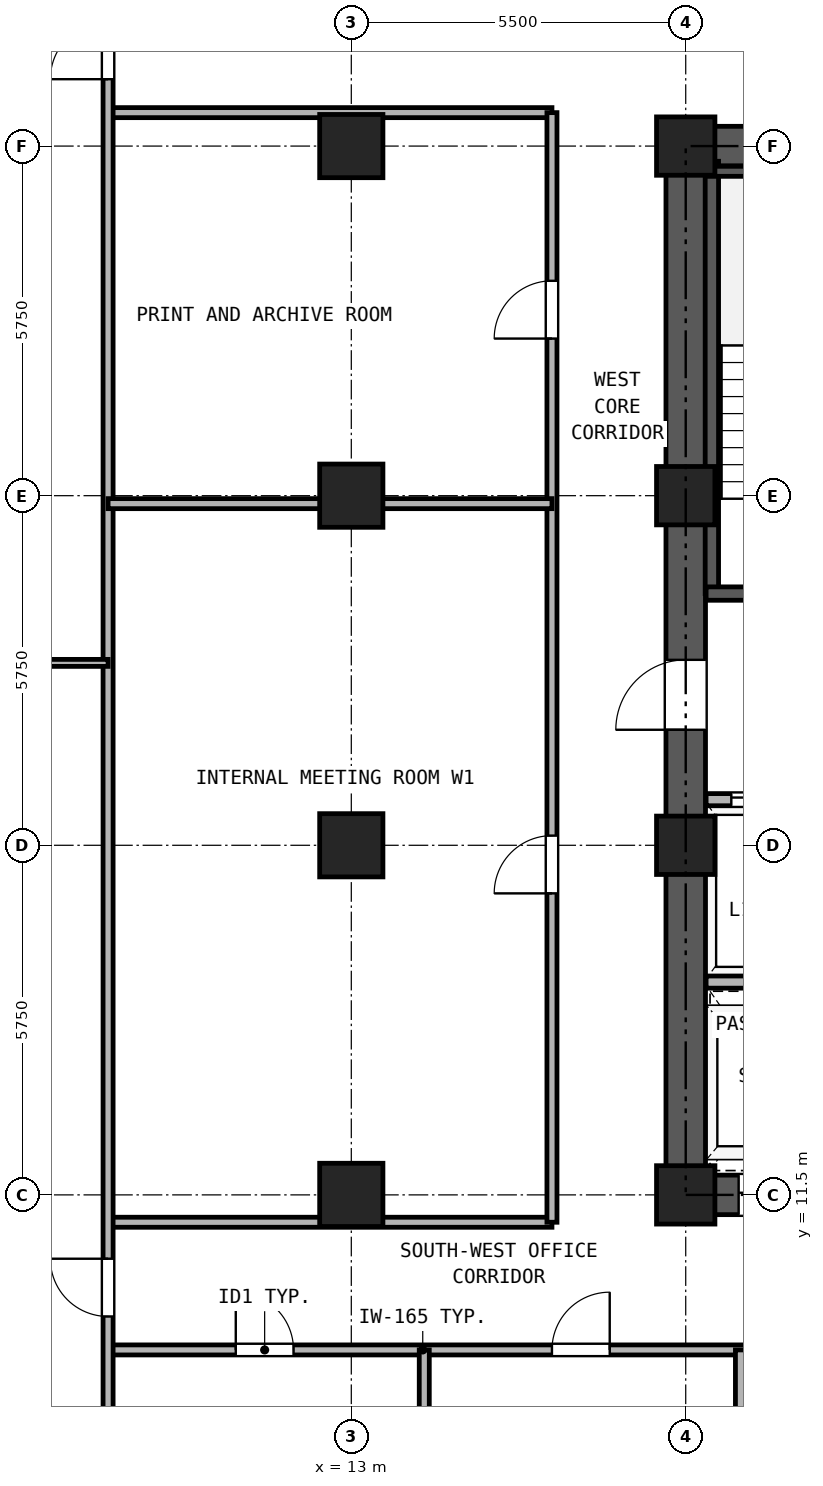
"""IFC4 building model, lengths in metres.
Left out: names, types, materials, properties, quantities, classifications, styles, units other than length and angle.
Written with IfcOpenShell. Run it as: python <this file> out.ifc"""

import sys

from ifc_helpers import new_model, si_unit, direction, frame, frame_2d, origin, origin_2d, place, context, subcontext, project, spatial, rectangle, hollow_rectangle, extrude, source, transform, mapped, element, fill, save


model = new_model("IFC4")
c1 = context("Model", 3, precision=1e-05, world=origin(), true_north=direction((0.0, 1.0)))
c2 = subcontext(c1, "Body", "Model", "MODEL_VIEW")
j1 = project(units=[si_unit("LENGTHUNIT", "METRE"), si_unit("PLANEANGLEUNIT", "RADIAN")], contexts=[c1])
p1 = place(None, origin())
s1 = spatial("IfcSite", under=j1, at=p1, CompositionType="ELEMENT")
p2 = place(p1, origin())
s2 = spatial("IfcBuilding", under=s1, at=p2, CompositionType="ELEMENT")
p3 = place(p2, frame((0.0, 0.0, 51.3)))
s3 = spatial("IfcBuildingStorey", under=s2, at=p3, CompositionType="ELEMENT", Elevation=51.3)
m1 = source(origin(), c2, "Body", "SweptSolid", [
    extrude(hollow_rectangle(XDim=1.04, YDim=1.04, WallThickness=0.065, at=origin_2d()), origin(), (0.0, 0.0, 1.0), 3.32),
])
for number, where, z_axis, x_axis in (
    (1, (13.0, 11.5, 0.0), (0.0, 0.0, 1.0), (1.0, 0.0, 0.0)),
    (2, (13.0, 17.25, 0.0), (0.0, 0.0, 1.0), (1.0, 0.0, 0.0)),
    (3, (13.0, 23.0, 0.0), (0.0, 0.0, 1.0), (1.0, 0.0, 0.0)),
    (4, (13.0, 28.75, 0.0), (0.0, 0.0, 1.0), (1.0, 0.0, 0.0)),
):
    element("IfcColumn", number, at=place(p3, frame(where, z_axis=z_axis, x_axis=x_axis)), inside=s3, PredefinedType="COLUMN", context=c2, shape_type="MappedRepresentation", body=[
        mapped(m1, transform((0.0, 0.0, 0.0), x_axis=(1.0, 0.0, 0.0), y_axis=(0.0, 1.0, 0.0), z_axis=(0.0, 0.0, 1.0), scale=1.0)),
    ])
m2 = source(origin(), c2, "Body", "SweptSolid", [
    extrude(hollow_rectangle(XDim=0.96, YDim=0.96, WallThickness=0.06, at=origin_2d()), origin(), (0.0, 0.0, 1.0), 3.32),
])
for number, where, z_axis, x_axis in (
    (5, (18.5, 11.5, 0.0), (0.0, 0.0, 1.0), (1.0, 0.0, 0.0)),
    (6, (18.5, 17.25, 0.0), (0.0, 0.0, 1.0), (1.0, 0.0, 0.0)),
    (7, (18.5, 23.0, 0.0), (0.0, 0.0, 1.0), (1.0, 0.0, 0.0)),
    (8, (18.5, 28.75, 0.0), (0.0, 0.0, 1.0), (1.0, 0.0, 0.0)),
):
    element("IfcColumn", number, at=place(p3, frame(where, z_axis=z_axis, x_axis=x_axis)), inside=s3, PredefinedType="COLUMN", context=c2, shape_type="MappedRepresentation", body=[
        mapped(m2, transform((0.0, 0.0, 0.0), x_axis=(1.0, 0.0, 0.0), y_axis=(0.0, 1.0, 0.0), z_axis=(0.0, 0.0, 1.0), scale=1.0)),
    ])
p4 = place(p3, frame((18.175, 11.5, 0.0), z_axis=(0.0, 0.0, 1.0), x_axis=(1.0, 0.0, 0.0)))
e9 = element("IfcWall", 9, at=p4, inside=s3, PredefinedType="SHEAR", context=c2, shape_type="SweptSolid", body=[
    extrude(rectangle(XDim=10.65, YDim=0.65, at=frame_2d((5.325, 0.0))), origin(), (0.0, 0.0, 1.0), 3.32),
])
p5 = place(p4, frame((1.195, 0.0, 0.0)))
e10 = element("IfcOpeningElement", 10, at=p5, cuts=e9, PredefinedType="OPENING", context=c2, shape_type="SweptSolid", body=[
    extrude(rectangle(XDim=1.1, YDim=2.25, at=frame_2d((0.55, 1.125))), frame((0.0, 0.335, 0.0), z_axis=(0.0, -1.0, 0.0), x_axis=(1.0, 0.0, 0.0)), (0.0, 0.0, 1.0), 0.67),
])
p6 = place(p4, frame((3.495, 0.0, 0.0)))
e11 = element("IfcOpeningElement", 11, at=p6, cuts=e9, PredefinedType="OPENING", context=c2, shape_type="SweptSolid", body=[
    extrude(rectangle(XDim=1.1, YDim=2.25, at=frame_2d((0.55, 1.125))), frame((0.0, 0.335, 0.0), z_axis=(0.0, -1.0, 0.0), x_axis=(1.0, 0.0, 0.0)), (0.0, 0.0, 1.0), 0.67),
])
p7 = place(p4, frame((5.925, 0.0, 0.0)))
e12 = element("IfcOpeningElement", 12, at=p7, cuts=e9, PredefinedType="OPENING", context=c2, shape_type="SweptSolid", body=[
    extrude(rectangle(XDim=1.1, YDim=2.25, at=frame_2d((0.55, 1.125))), frame((0.0, 0.335, 0.0), z_axis=(0.0, -1.0, 0.0), x_axis=(1.0, 0.0, 0.0)), (0.0, 0.0, 1.0), 0.67),
])
p8 = place(p4, frame((8.325, 0.0, 0.0)))
e13 = element("IfcOpeningElement", 13, at=p8, cuts=e9, PredefinedType="OPENING", context=c2, shape_type="SweptSolid", body=[
    extrude(rectangle(XDim=1.1, YDim=2.25, at=frame_2d((0.55, 1.125))), frame((0.0, 0.335, 0.0), z_axis=(0.0, -1.0, 0.0), x_axis=(1.0, 0.0, 0.0)), (0.0, 0.0, 1.0), 0.67),
])
p9 = place(p3, frame((18.175, 28.75, 0.0), z_axis=(0.0, 0.0, 1.0), x_axis=(1.0, 0.0, 0.0)))
e14 = element("IfcWall", 14, at=p9, inside=s3, PredefinedType="SHEAR", context=c2, shape_type="SweptSolid", body=[
    extrude(rectangle(XDim=10.65, YDim=0.65, at=frame_2d((5.325, 0.0))), origin(), (0.0, 0.0, 1.0), 3.32),
])
p10 = place(p9, frame((4.205, 0.0, 0.0)))
e15 = element("IfcOpeningElement", 15, at=p10, cuts=e14, PredefinedType="OPENING", context=c2, shape_type="SweptSolid", body=[
    extrude(rectangle(XDim=0.9, YDim=2.05, at=frame_2d((0.45, 1.025))), frame((0.0, 0.335, 0.0), z_axis=(0.0, -1.0, 0.0), x_axis=(1.0, 0.0, 0.0)), (0.0, 0.0, 1.0), 0.67),
])
p11 = place(p9, frame((5.745, 0.0, 0.0)))
e16 = element("IfcOpeningElement", 16, at=p11, cuts=e14, PredefinedType="OPENING", context=c2, shape_type="SweptSolid", body=[
    extrude(rectangle(XDim=0.9, YDim=2.05, at=frame_2d((0.45, 1.025))), frame((0.0, 0.335, 0.0), z_axis=(0.0, -1.0, 0.0), x_axis=(1.0, 0.0, 0.0)), (0.0, 0.0, 1.0), 0.67),
])
p12 = place(p3, frame((18.5, 11.825, 0.0), z_axis=(0.0, 0.0, 1.0), x_axis=(0.0, 1.0, 0.0)))
e17 = element("IfcWall", 17, at=p12, inside=s3, PredefinedType="SHEAR", context=c2, shape_type="SweptSolid", body=[
    extrude(rectangle(XDim=16.6, YDim=0.65, at=frame_2d((8.3, 0.0))), origin(), (0.0, 0.0, 1.0), 3.32),
])
p13 = place(p12, frame((7.325, 0.0, 0.0)))
e18 = element("IfcOpeningElement", 18, at=p13, cuts=e17, PredefinedType="OPENING", context=c2, shape_type="SweptSolid", body=[
    extrude(rectangle(XDim=1.15, YDim=2.2, at=frame_2d((0.575, 1.1))), frame((0.0, 0.335, 0.0), z_axis=(0.0, -1.0, 0.0), x_axis=(1.0, 0.0, 0.0)), (0.0, 0.0, 1.0), 0.67),
])
p14 = place(p3, frame((18.93, 21.39, 0.0), z_axis=(0.0, 0.0, 1.0), x_axis=(0.0, 1.0, 0.0)))
e19 = element("IfcWall", 19, at=p14, inside=s3, PredefinedType="SOLIDWALL", context=c2, shape_type="SweptSolid", body=[
    extrude(rectangle(XDim=7.11, YDim=0.22, at=frame_2d((3.555, 0.0))), origin(), (0.0, 0.0, 1.0), 3.32),
])
p15 = place(p3, frame((18.835, 28.335, 0.0), z_axis=(0.0, 0.0, 1.0), x_axis=(1.0, 0.0, 0.0)))
e20 = element("IfcWall", 20, at=p15, inside=s3, PredefinedType="PARTITIONING", context=c2, shape_type="SweptSolid", body=[
    extrude(rectangle(XDim=3.275, YDim=0.165, at=frame_2d((1.638, 0.0))), origin(), (0.0, 0.0, 1.0), 3.32),
])
p16 = place(p3, frame((18.835, 21.39, 0.0), z_axis=(0.0, 0.0, 1.0), x_axis=(1.0, 0.0, 0.0)))
e21 = element("IfcWall", 21, at=p16, inside=s3, PredefinedType="SOLIDWALL", context=c2, shape_type="SweptSolid", body=[
    extrude(rectangle(XDim=6.295, YDim=0.22, at=frame_2d((3.147, 0.0))), origin(), (0.0, 0.0, 1.0), 3.32),
])
p17 = place(p16, frame((1.015, 0.0, 0.0)))
e22 = element("IfcOpeningElement", 22, at=p17, cuts=e21, PredefinedType="OPENING", context=c2, shape_type="SweptSolid", body=[
    extrude(rectangle(XDim=1.15, YDim=2.2, at=frame_2d((0.575, 1.1))), frame((0.0, 0.12, 0.0), z_axis=(0.0, -1.0, 0.0), x_axis=(1.0, 0.0, 0.0)), (0.0, 0.0, 1.0), 0.24),
])
p18 = place(p16, frame((4.745, 0.0, 0.0)))
e23 = element("IfcOpeningElement", 23, at=p18, cuts=e21, PredefinedType="OPENING", context=c2, shape_type="SweptSolid", body=[
    extrude(rectangle(XDim=1.1, YDim=2.25, at=frame_2d((0.55, 1.125))), frame((0.0, 0.12, 0.0), z_axis=(0.0, -1.0, 0.0), x_axis=(1.0, 0.0, 0.0)), (0.0, 0.0, 1.0), 0.24),
])
p19 = place(p3, frame((18.835, 18.0, 0.0), z_axis=(0.0, 0.0, 1.0), x_axis=(1.0, 0.0, 0.0)))
e24 = element("IfcWall", 24, at=p19, inside=s3, PredefinedType="PARTITIONING", context=c2, shape_type="SweptSolid", body=[
    extrude(rectangle(XDim=9.33, YDim=0.2, at=frame_2d((4.665, 0.0))), origin(), (0.0, 0.0, 1.0), 3.32),
])
p20 = place(p19, frame((0.415, 0.0, 0.0)))
e25 = element("IfcOpeningElement", 25, at=p20, cuts=e24, PredefinedType="OPENING", context=c2, shape_type="SweptSolid", body=[
    extrude(rectangle(XDim=1.3, YDim=2.3, at=frame_2d((0.65, 1.15))), frame((0.0, 0.11, 0.0), z_axis=(0.0, -1.0, 0.0), x_axis=(1.0, 0.0, 0.0)), (0.0, 0.0, 1.0), 0.22),
])
p21 = place(p19, frame((2.515, 0.0, 0.0)))
e26 = element("IfcOpeningElement", 26, at=p21, cuts=e24, PredefinedType="OPENING", context=c2, shape_type="SweptSolid", body=[
    extrude(rectangle(XDim=1.3, YDim=2.3, at=frame_2d((0.65, 1.15))), frame((0.0, 0.11, 0.0), z_axis=(0.0, -1.0, 0.0), x_axis=(1.0, 0.0, 0.0)), (0.0, 0.0, 1.0), 0.22),
])
p22 = place(p19, frame((7.015, 0.0, 0.0)))
e27 = element("IfcOpeningElement", 27, at=p22, cuts=e24, PredefinedType="OPENING", context=c2, shape_type="SweptSolid", body=[
    extrude(rectangle(XDim=1.0, YDim=2.15, at=frame_2d((0.5, 1.075))), frame((0.0, 0.11, 0.0), z_axis=(0.0, -1.0, 0.0), x_axis=(1.0, 0.0, 0.0)), (0.0, 0.0, 1.0), 0.22),
])
p23 = place(p3, frame((18.835, 15.0, 0.0), z_axis=(0.0, 0.0, 1.0), x_axis=(1.0, 0.0, 0.0)))
e28 = element("IfcWall", 28, at=p23, inside=s3, PredefinedType="PARTITIONING", context=c2, shape_type="SweptSolid", body=[
    extrude(rectangle(XDim=9.33, YDim=0.2, at=frame_2d((4.665, 0.0))), origin(), (0.0, 0.0, 1.0), 3.32),
])
p24 = place(p3, frame((9.0, 8.95, 0.0), z_axis=(0.0, 0.0, 1.0), x_axis=(1.0, 0.0, 0.0)))
e29 = element("IfcWall", 29, at=p24, inside=s3, PredefinedType="PARTITIONING", context=c2, shape_type="SweptSolid", body=[
    extrude(rectangle(XDim=29.0, YDim=0.165, at=frame_2d((14.5, 0.0))), origin(), (0.0, 0.0, 1.0), 3.32),
])
p25 = place(p24, frame((2.1, 0.0, 0.0)))
e30 = element("IfcOpeningElement", 30, at=p25, cuts=e29, PredefinedType="OPENING", context=c2, shape_type="SweptSolid", body=[
    extrude(rectangle(XDim=0.95, YDim=2.15, at=frame_2d((0.475, 1.075))), frame((0.0, 0.093, 0.0), z_axis=(0.0, -1.0, 0.0), x_axis=(1.0, 0.0, 0.0)), (0.0, 0.0, 1.0), 0.185),
])
p26 = place(p24, frame((7.3, 0.0, 0.0)))
e31 = element("IfcOpeningElement", 31, at=p26, cuts=e29, PredefinedType="OPENING", context=c2, shape_type="SweptSolid", body=[
    extrude(rectangle(XDim=0.95, YDim=2.15, at=frame_2d((0.475, 1.075))), frame((0.0, 0.093, 0.0), z_axis=(0.0, -1.0, 0.0), x_axis=(1.0, 0.0, 0.0)), (0.0, 0.0, 1.0), 0.185),
])
p27 = place(p24, frame((12.5, 0.0, 0.0)))
e32 = element("IfcOpeningElement", 32, at=p27, cuts=e29, PredefinedType="OPENING", context=c2, shape_type="SweptSolid", body=[
    extrude(rectangle(XDim=0.95, YDim=2.15, at=frame_2d((0.475, 1.075))), frame((0.0, 0.093, 0.0), z_axis=(0.0, -1.0, 0.0), x_axis=(1.0, 0.0, 0.0)), (0.0, 0.0, 1.0), 0.185),
])
p28 = place(p24, frame((17.7, 0.0, 0.0)))
e33 = element("IfcOpeningElement", 33, at=p28, cuts=e29, PredefinedType="OPENING", context=c2, shape_type="SweptSolid", body=[
    extrude(rectangle(XDim=0.95, YDim=2.15, at=frame_2d((0.475, 1.075))), frame((0.0, 0.093, 0.0), z_axis=(0.0, -1.0, 0.0), x_axis=(1.0, 0.0, 0.0)), (0.0, 0.0, 1.0), 0.185),
])
p29 = place(p24, frame((22.3, 0.0, 0.0)))
e34 = element("IfcOpeningElement", 34, at=p29, cuts=e29, PredefinedType="OPENING", context=c2, shape_type="SweptSolid", body=[
    extrude(rectangle(XDim=0.95, YDim=2.15, at=frame_2d((0.475, 1.075))), frame((0.0, 0.093, 0.0), z_axis=(0.0, -1.0, 0.0), x_axis=(1.0, 0.0, 0.0)), (0.0, 0.0, 1.0), 0.185),
])
p30 = place(p24, frame((25.4, 0.0, 0.0)))
e35 = element("IfcOpeningElement", 35, at=p30, cuts=e29, PredefinedType="OPENING", context=c2, shape_type="SweptSolid", body=[
    extrude(rectangle(XDim=0.92, YDim=2.1, at=frame_2d((0.46, 1.05))), frame((0.0, 0.093, 0.0), z_axis=(0.0, -1.0, 0.0), x_axis=(1.0, 0.0, 0.0)), (0.0, 0.0, 1.0), 0.185),
])
p31 = place(p24, frame((27.5, 0.0, 0.0)))
e36 = element("IfcOpeningElement", 36, at=p31, cuts=e29, PredefinedType="OPENING", context=c2, shape_type="SweptSolid", body=[
    extrude(rectangle(XDim=0.92, YDim=2.1, at=frame_2d((0.46, 1.05))), frame((0.0, 0.093, 0.0), z_axis=(0.0, -1.0, 0.0), x_axis=(1.0, 0.0, 0.0)), (0.0, 0.0, 1.0), 0.185),
])
for number, where, z_axis, x_axis in (
    (37, (9.0, 11.05, 0.0), (0.0, 0.0, 1.0), (1.0, 0.0, 0.0)),
    (38, (9.0, 29.3, 0.0), (0.0, 0.0, 1.0), (1.0, 0.0, 0.0)),
):
    element("IfcWall", number, at=place(p3, frame(where, z_axis=z_axis, x_axis=x_axis)), inside=s3, PredefinedType="PARTITIONING", context=c2, shape_type="SweptSolid", body=[
        extrude(rectangle(XDim=7.3, YDim=0.165, at=frame_2d((3.65, 0.0))), origin(), (0.0, 0.0, 1.0), 3.32),
    ])
p32 = place(p3, frame((16.3, 11.05, 0.0), z_axis=(0.0, 0.0, 1.0), x_axis=(0.0, 1.0, 0.0)))
e39 = element("IfcWall", 39, at=p32, inside=s3, PredefinedType="PARTITIONING", context=c2, shape_type="SweptSolid", body=[
    extrude(rectangle(XDim=18.25, YDim=0.165, at=frame_2d((9.125, 0.0))), origin(), (0.0, 0.0, 1.0), 3.32),
])
p33 = place(p32, frame((5.409, 0.0, 0.0)))
e40 = element("IfcOpeningElement", 40, at=p33, cuts=e39, PredefinedType="OPENING", context=c2, shape_type="SweptSolid", body=[
    extrude(rectangle(XDim=0.95, YDim=2.15, at=frame_2d((0.475, 1.075))), frame((0.0, 0.093, 0.0), z_axis=(0.0, -1.0, 0.0), x_axis=(1.0, 0.0, 0.0)), (0.0, 0.0, 1.0), 0.185),
])
p34 = place(p32, frame((14.534, 0.0, 0.0)))
e41 = element("IfcOpeningElement", 41, at=p34, cuts=e39, PredefinedType="OPENING", context=c2, shape_type="SweptSolid", body=[
    extrude(rectangle(XDim=0.95, YDim=2.15, at=frame_2d((0.475, 1.075))), frame((0.0, 0.093, 0.0), z_axis=(0.0, -1.0, 0.0), x_axis=(1.0, 0.0, 0.0)), (0.0, 0.0, 1.0), 0.185),
])
p35 = place(p3, frame((9.0, 0.16, 0.0), z_axis=(0.0, 0.0, 1.0), x_axis=(0.0, 1.0, 0.0)))
e42 = element("IfcWall", 42, at=p35, inside=s3, PredefinedType="PARTITIONING", context=c2, shape_type="SweptSolid", body=[
    extrude(rectangle(XDim=40.18, YDim=0.165, at=frame_2d((20.09, 0.0))), origin(), (0.0, 0.0, 1.0), 3.32),
])
p36 = place(p35, frame((9.34, 0.0, 0.0)))
e43 = element("IfcOpeningElement", 43, at=p36, cuts=e42, PredefinedType="OPENING", context=c2, shape_type="SweptSolid", body=[
    extrude(rectangle(XDim=0.95, YDim=2.15, at=frame_2d((0.475, 1.075))), frame((0.0, 0.093, 0.0), z_axis=(0.0, -1.0, 0.0), x_axis=(1.0, 0.0, 0.0)), (0.0, 0.0, 1.0), 0.185),
])
p37 = place(p35, frame((29.69, 0.0, 0.0)))
e44 = element("IfcOpeningElement", 44, at=p37, cuts=e42, PredefinedType="OPENING", context=c2, shape_type="SweptSolid", body=[
    extrude(rectangle(XDim=0.95, YDim=2.15, at=frame_2d((0.475, 1.075))), frame((0.0, 0.093, 0.0), z_axis=(0.0, -1.0, 0.0), x_axis=(1.0, 0.0, 0.0)), (0.0, 0.0, 1.0), 0.185),
])
for number, where, z_axis, x_axis in (
    (45, (14.2, 0.16, 0.0), (0.0, 0.0, 1.0), (0.0, 1.0, 0.0)),
    (46, (19.4, 0.16, 0.0), (0.0, 0.0, 1.0), (0.0, 1.0, 0.0)),
):
    element("IfcWall", number, at=place(p3, frame(where, z_axis=z_axis, x_axis=x_axis)), inside=s3, PredefinedType="PARTITIONING", context=c2, shape_type="SweptSolid", body=[
        extrude(rectangle(XDim=8.79, YDim=0.165, at=frame_2d((4.395, 0.0))), origin(), (0.0, 0.0, 1.0), 3.32),
    ])
p38 = place(p3, frame((0.16, 20.25, 0.0), z_axis=(0.0, 0.0, 1.0), x_axis=(1.0, 0.0, 0.0)))
e47 = element("IfcWall", 47, at=p38, inside=s3, PredefinedType="PARTITIONING", context=c2, shape_type="SweptSolid", body=[
    extrude(rectangle(XDim=8.84, YDim=0.115, at=frame_2d((4.42, 0.0))), origin(), (0.0, 0.0, 1.0), 2.898),
])
p39 = place(p3, frame((9.0, 22.869, 0.0), z_axis=(0.0, 0.0, 1.0), x_axis=(1.0, 0.0, 0.0)))
e48 = element("IfcWall", 48, at=p39, inside=s3, PredefinedType="PARTITIONING", context=c2, shape_type="SweptSolid", body=[
    extrude(rectangle(XDim=7.3, YDim=0.165, at=frame_2d((3.65, 0.0))), origin(), (0.0, 0.0, 1.0), 2.539),
])
p40 = place(p20, origin())
e49 = element("IfcDoor", 49, at=p40, inside=s3, OperationType="DOUBLE_DOOR_SLIDING", PredefinedType="DOOR", context=c2, shape_type="SweptSolid", body=[
    extrude(rectangle(XDim=1.3, YDim=2.3, at=frame_2d((0.65, 1.15))), frame((0.0, 0.025, 0.0), z_axis=(0.0, -1.0, 0.0), x_axis=(1.0, 0.0, 0.0)), (0.0, 0.0, 1.0), 0.05),
])
fill(e25, e49)
p41 = place(p13, frame((1.15, 0.0, 0.0), z_axis=(0.0, 0.0, 1.0), x_axis=(-1.0, 0.0, 0.0)))
e50 = element("IfcDoor", 50, at=p41, inside=s3, OperationType="SINGLE_SWING_LEFT", PredefinedType="DOOR", context=c2, shape_type="SweptSolid", body=[
    extrude(rectangle(XDim=1.15, YDim=2.2, at=frame_2d((0.575, 1.1))), frame((0.0, 0.025, 0.0), z_axis=(0.0, -1.0, 0.0), x_axis=(1.0, 0.0, 0.0)), (0.0, 0.0, 1.0), 0.05),
])
fill(e18, e50)
p42 = place(p5, frame((1.1, 0.0, 0.0), z_axis=(0.0, 0.0, 1.0), x_axis=(-1.0, 0.0, 0.0)))
e51 = element("IfcDoor", 51, at=p42, inside=s3, OperationType="DOUBLE_DOOR_SLIDING", PredefinedType="DOOR", context=c2, shape_type="SweptSolid", body=[
    extrude(rectangle(XDim=1.1, YDim=2.25, at=frame_2d((0.55, 1.125))), frame((0.0, 0.025, 0.0), z_axis=(0.0, -1.0, 0.0), x_axis=(1.0, 0.0, 0.0)), (0.0, 0.0, 1.0), 0.05),
])
fill(e10, e51)
p43 = place(p25, frame((0.95, 0.0, 0.0), z_axis=(0.0, 0.0, 1.0), x_axis=(-1.0, 0.0, 0.0)))
e52 = element("IfcDoor", 52, at=p43, inside=s3, OperationType="SINGLE_SWING_LEFT", PredefinedType="DOOR", context=c2, shape_type="SweptSolid", body=[
    extrude(rectangle(XDim=0.95, YDim=2.15, at=frame_2d((0.475, 1.075))), frame((0.0, 0.025, 0.0), z_axis=(0.0, -1.0, 0.0), x_axis=(1.0, 0.0, 0.0)), (0.0, 0.0, 1.0), 0.05),
])
fill(e30, e52)
p44 = place(p26, frame((0.95, 0.0, 0.0), z_axis=(0.0, 0.0, 1.0), x_axis=(-1.0, 0.0, 0.0)))
e53 = element("IfcDoor", 53, at=p44, inside=s3, OperationType="SINGLE_SWING_RIGHT", PredefinedType="DOOR", context=c2, shape_type="SweptSolid", body=[
    extrude(rectangle(XDim=0.95, YDim=2.15, at=frame_2d((0.475, 1.075))), frame((0.0, 0.025, 0.0), z_axis=(0.0, -1.0, 0.0), x_axis=(1.0, 0.0, 0.0)), (0.0, 0.0, 1.0), 0.05),
])
fill(e31, e53)
p45 = place(p36, frame((0.95, 0.0, 0.0), z_axis=(0.0, 0.0, 1.0), x_axis=(-1.0, 0.0, 0.0)))
e54 = element("IfcDoor", 54, at=p45, inside=s3, OperationType="SINGLE_SWING_RIGHT", PredefinedType="DOOR", context=c2, shape_type="SweptSolid", body=[
    extrude(rectangle(XDim=0.95, YDim=2.15, at=frame_2d((0.475, 1.075))), frame((0.0, 0.025, 0.0), z_axis=(0.0, -1.0, 0.0), x_axis=(1.0, 0.0, 0.0)), (0.0, 0.0, 1.0), 0.05),
])
fill(e43, e54)
p46 = place(p37, frame((0.95, 0.0, 0.0), z_axis=(0.0, 0.0, 1.0), x_axis=(-1.0, 0.0, 0.0)))
e55 = element("IfcDoor", 55, at=p46, inside=s3, OperationType="SINGLE_SWING_LEFT", PredefinedType="DOOR", context=c2, shape_type="SweptSolid", body=[
    extrude(rectangle(XDim=0.95, YDim=2.15, at=frame_2d((0.475, 1.075))), frame((0.0, 0.025, 0.0), z_axis=(0.0, -1.0, 0.0), x_axis=(1.0, 0.0, 0.0)), (0.0, 0.0, 1.0), 0.05),
])
fill(e44, e55)
p47 = place(p33, frame((0.95, 0.0, 0.0), z_axis=(0.0, 0.0, 1.0), x_axis=(-1.0, 0.0, 0.0)))
e56 = element("IfcDoor", 56, at=p47, inside=s3, OperationType="SINGLE_SWING_LEFT", PredefinedType="DOOR", context=c2, shape_type="SweptSolid", body=[
    extrude(rectangle(XDim=0.95, YDim=2.15, at=frame_2d((0.475, 1.075))), frame((0.0, 0.025, 0.0), z_axis=(0.0, -1.0, 0.0), x_axis=(1.0, 0.0, 0.0)), (0.0, 0.0, 1.0), 0.05),
])
fill(e40, e56)
p48 = place(p34, frame((0.95, 0.0, 0.0), z_axis=(0.0, 0.0, 1.0), x_axis=(-1.0, 0.0, 0.0)))
e57 = element("IfcDoor", 57, at=p48, inside=s3, OperationType="SINGLE_SWING_LEFT", PredefinedType="DOOR", context=c2, shape_type="SweptSolid", body=[
    extrude(rectangle(XDim=0.95, YDim=2.15, at=frame_2d((0.475, 1.075))), frame((0.0, 0.025, 0.0), z_axis=(0.0, -1.0, 0.0), x_axis=(1.0, 0.0, 0.0)), (0.0, 0.0, 1.0), 0.05),
])
fill(e41, e57)
save(model, sys.argv[1])
